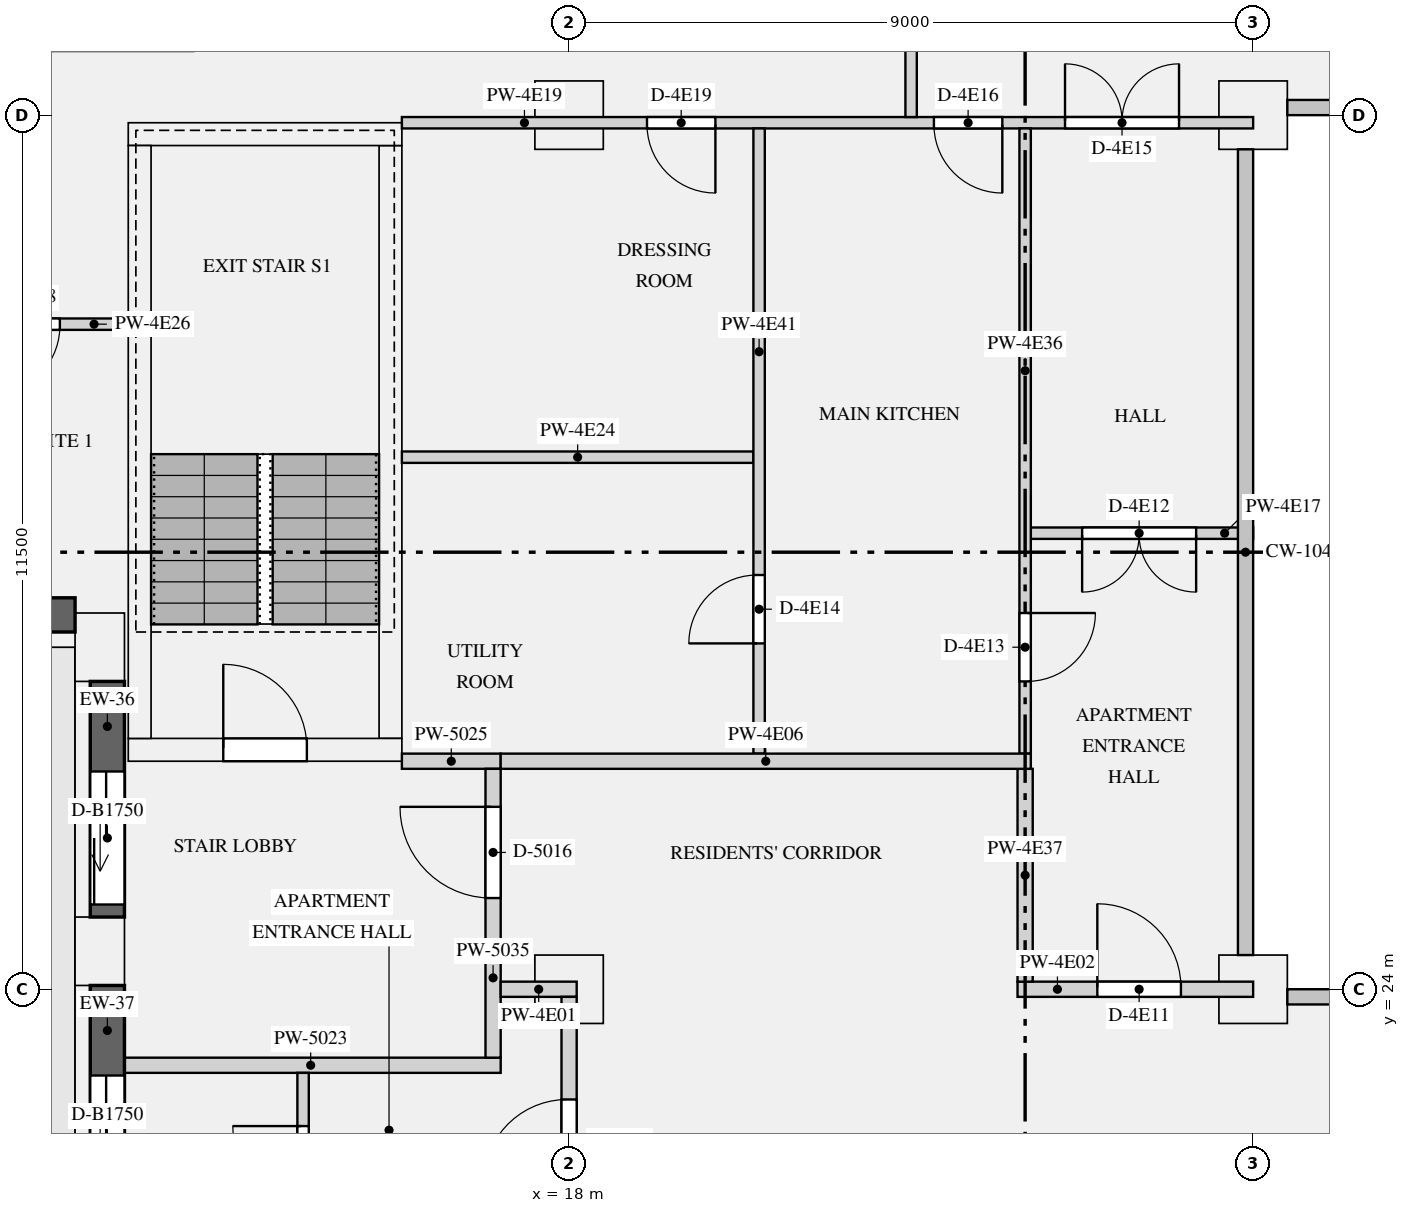
"""IFC4 building model, lengths in metres.
Left out: names, types, materials, properties, quantities, classifications, styles, units other than length and angle.
Written with IfcOpenShell. Run it as: python <this file> out.ifc"""

import sys

from ifc_helpers import new_model, si_unit, direction, frame, frame_2d, origin, origin_2d, place, context, subcontext, project, spatial, rectangle, extrude, element, fill, save


model = new_model("IFC4")
c1 = context("Model", 3, precision=1e-05, world=origin(), true_north=direction((0.0, 1.0)))
c2 = subcontext(c1, "Body", "Model", "MODEL_VIEW")
j1 = project(units=[si_unit("LENGTHUNIT", "METRE"), si_unit("PLANEANGLEUNIT", "RADIAN")], contexts=[c1])
p1 = place(None, origin())
s1 = spatial("IfcSite", under=j1, at=p1, CompositionType="ELEMENT")
p2 = place(p1, origin())
s2 = spatial("IfcBuilding", under=s1, at=p2, CompositionType="ELEMENT")
p3 = place(p2, frame((0.0, 0.0, 232.65)))
s3 = spatial("IfcBuildingStorey", under=s2, at=p3, CompositionType="ELEMENT", Elevation=232.65)
for number, where, z_axis, x_axis in (
    (1, (11.825, 28.5, 0.0), (0.0, 0.0, 1.0), (0.0, -1.0, 0.0)),
    (2, (11.825, 24.5, 0.0), (0.0, 0.0, 1.0), (0.0, -1.0, 0.0)),
):
    element("IfcColumn", number, at=place(p3, frame(where, z_axis=z_axis, x_axis=x_axis)), inside=s3, PredefinedType="USERDEFINED", context=c2, shape_type="SweptSolid", body=[
        extrude(rectangle(XDim=0.9, YDim=0.65, at=origin_2d()), origin(), (0.0, 0.0, 1.0), 3.15),
    ])
for number, where, z_axis, x_axis in (
    (3, (18.0, 24.0, 0.0), (0.0, 0.0, 1.0), (1.0, 0.0, 0.0)),
    (4, (27.0, 24.0, 0.0), (0.0, 0.0, 1.0), (1.0, 0.0, 0.0)),
    (5, (18.0, 35.5, 0.0), (0.0, 0.0, 1.0), (1.0, 0.0, 0.0)),
    (6, (27.0, 35.5, 0.0), (0.0, 0.0, 1.0), (1.0, 0.0, 0.0)),
):
    element("IfcColumn", number, at=place(p3, frame(where, z_axis=z_axis, x_axis=x_axis)), inside=s3, PredefinedType="COLUMN", context=c2, shape_type="SweptSolid", body=[
        extrude(rectangle(XDim=0.9, YDim=0.9, at=origin_2d()), origin(), (0.0, 0.0, 1.0), 3.15),
    ])
p4 = place(p3, frame((12.2, 27.15, 0.0), z_axis=(0.0, 0.0, 1.0), x_axis=(1.0, 0.0, 0.0)))
e7 = element("IfcWall", 7, at=p4, inside=s3, PredefinedType="SHEAR", context=c2, shape_type="SweptSolid", body=[
    extrude(rectangle(XDim=3.6, YDim=0.3, at=frame_2d((1.8, 0.0))), origin(), (0.0, 0.0, 1.0), 3.15),
])
p5 = place(p4, frame((1.25, 0.0, 0.0)))
e8 = element("IfcOpeningElement", 8, at=p5, cuts=e7, PredefinedType="OPENING", context=c2, shape_type="SweptSolid", body=[
    extrude(rectangle(XDim=1.1, YDim=2.1, at=frame_2d((0.55, 1.05))), frame((0.0, 0.16, 0.0), z_axis=(0.0, -1.0, 0.0), x_axis=(1.0, 0.0, 0.0)), (0.0, 0.0, 1.0), 0.32),
])
p6 = place(p3, frame((12.2, 35.25, 0.0), z_axis=(0.0, 0.0, 1.0), x_axis=(1.0, 0.0, 0.0)))
e9 = element("IfcWall", 9, at=p6, inside=s3, PredefinedType="SHEAR", context=c2, shape_type="SweptSolid", body=[
    extrude(rectangle(XDim=3.6, YDim=0.3, at=frame_2d((1.8, 0.0))), origin(), (0.0, 0.0, 1.0), 3.15),
])
for number, where, z_axis, x_axis in (
    (10, (12.35, 27.3, 0.0), (0.0, 0.0, 1.0), (0.0, 1.0, 0.0)),
    (11, (15.65, 27.3, 0.0), (0.0, 0.0, 1.0), (0.0, 1.0, 0.0)),
):
    element("IfcWall", number, at=place(p3, frame(where, z_axis=z_axis, x_axis=x_axis)), inside=s3, PredefinedType="SHEAR", context=c2, shape_type="SweptSolid", body=[
        extrude(rectangle(XDim=7.8, YDim=0.3, at=frame_2d((3.9, 0.0))), origin(), (0.0, 0.0, 1.0), 3.15),
    ])
p7 = place(p3, frame((9.9, 28.925, 0.9), z_axis=(0.0, 0.0, 1.0), x_axis=(1.0, 0.0, 0.0)))
e12 = element("IfcWall", 12, at=p7, inside=s3, PredefinedType="SOLIDWALL", context=c2, shape_type="SweptSolid", body=[
    extrude(rectangle(XDim=1.6, YDim=0.45, at=frame_2d((0.8, 0.0))), origin(), (0.0, 0.0, 1.0), 1.9),
])
p8 = place(p3, frame((11.925, 28.05, 0.0), z_axis=(0.0, 0.0, 1.0), x_axis=(0.0, -1.0, 0.0)))
e13 = element("IfcWall", 13, at=p8, inside=s3, PredefinedType="SOLIDWALL", context=c2, shape_type="SweptSolid", body=[
    extrude(rectangle(XDim=3.1, YDim=0.45, at=frame_2d((1.55, 0.0))), origin(), (0.0, 0.0, 1.0), 2.8),
])
p9 = place(p8, frame((1.185, 0.0, 0.0)))
e14 = element("IfcOpeningElement", 14, at=p9, cuts=e13, PredefinedType="OPENING", context=c2, shape_type="SweptSolid", body=[
    extrude(rectangle(XDim=1.75, YDim=2.3, at=frame_2d((0.875, 1.15))), frame((0.0, 0.235, 0.0), z_axis=(0.0, -1.0, 0.0), x_axis=(1.0, 0.0, 0.0)), (0.0, 0.0, 1.0), 0.47),
])
p10 = place(p3, frame((11.925, 24.05, 0.0), z_axis=(0.0, 0.0, 1.0), x_axis=(0.0, -1.0, 0.0)))
e15 = element("IfcWall", 15, at=p10, inside=s3, PredefinedType="SOLIDWALL", context=c2, shape_type="SweptSolid", body=[
    extrude(rectangle(XDim=3.1, YDim=0.45, at=frame_2d((1.55, 0.0))), origin(), (0.0, 0.0, 1.0), 2.8),
])
p11 = place(p10, frame((1.185, 0.0, 0.0)))
e16 = element("IfcOpeningElement", 16, at=p11, cuts=e15, PredefinedType="OPENING", context=c2, shape_type="SweptSolid", body=[
    extrude(rectangle(XDim=1.75, YDim=2.3, at=frame_2d((0.875, 1.15))), frame((0.0, 0.235, 0.0), z_axis=(0.0, -1.0, 0.0), x_axis=(1.0, 0.0, 0.0)), (0.0, 0.0, 1.0), 0.47),
])
p12 = place(p3, frame((12.1, 23.0, 0.0), z_axis=(0.0, 0.0, 1.0), x_axis=(1.0, 0.0, 0.0)))
e17 = element("IfcWall", 17, at=p12, inside=s3, PredefinedType="PARTITIONING", context=c2, shape_type="SweptSolid", body=[
    extrude(rectangle(XDim=5.0, YDim=0.2, at=frame_2d((2.5, 0.0))), origin(), (0.0, 0.0, 1.0), 2.8),
])
p13 = place(p3, frame((15.8, 27.0, 0.0), z_axis=(0.0, 0.0, 1.0), x_axis=(1.0, 0.0, 0.0)))
e18 = element("IfcWall", 18, at=p13, inside=s3, PredefinedType="PARTITIONING", context=c2, shape_type="SweptSolid", body=[
    extrude(rectangle(XDim=1.3, YDim=0.2, at=frame_2d((0.65, 0.0))), origin(), (0.0, 0.0, 1.0), 2.8),
])
p14 = place(p3, frame((17.0, 23.1, 0.0), z_axis=(0.0, 0.0, 1.0), x_axis=(0.0, 1.0, 0.0)))
e19 = element("IfcWall", 19, at=p14, inside=s3, PredefinedType="PARTITIONING", context=c2, shape_type="SweptSolid", body=[
    extrude(rectangle(XDim=3.8, YDim=0.2, at=frame_2d((1.9, 0.0))), origin(), (0.0, 0.0, 1.0), 2.8),
])
p15 = place(p14, frame((2.1, 0.0, 0.0)))
e20 = element("IfcOpeningElement", 20, at=p15, cuts=e19, PredefinedType="OPENING", context=c2, shape_type="SweptSolid", body=[
    extrude(rectangle(XDim=1.2, YDim=2.1, at=frame_2d((0.6, 1.05))), frame((0.0, 0.11, 0.0), z_axis=(0.0, -1.0, 0.0), x_axis=(1.0, 0.0, 0.0)), (0.0, 0.0, 1.0), 0.22),
])
p16 = place(p3, frame((17.1, 24.0, 0.0), z_axis=(0.0, 0.0, 1.0), x_axis=(1.0, 0.0, 0.0)))
e21 = element("IfcWall", 21, at=p16, inside=s3, PredefinedType="PARTITIONING", context=c2, shape_type="SweptSolid", body=[
    extrude(rectangle(XDim=1.0, YDim=0.2, at=frame_2d((0.5, 0.0))), origin(), (0.0, 0.0, 1.0), 2.8),
])
p17 = place(p3, frame((23.9, 24.0, 0.0), z_axis=(0.0, 0.0, 1.0), x_axis=(1.0, 0.0, 0.0)))
e22 = element("IfcWall", 22, at=p17, inside=s3, PredefinedType="PARTITIONING", context=c2, shape_type="SweptSolid", body=[
    extrude(rectangle(XDim=3.1, YDim=0.2, at=frame_2d((1.55, 0.0))), origin(), (0.0, 0.0, 1.0), 2.8),
])
p18 = place(p17, frame((1.05, 0.0, 0.0)))
e23 = element("IfcOpeningElement", 23, at=p18, cuts=e22, PredefinedType="OPENING", context=c2, shape_type="SweptSolid", body=[
    extrude(rectangle(XDim=1.1, YDim=2.1, at=frame_2d((0.55, 1.05))), frame((0.0, 0.11, 0.0), z_axis=(0.0, -1.0, 0.0), x_axis=(1.0, 0.0, 0.0)), (0.0, 0.0, 1.0), 0.22),
])
p19 = place(p3, frame((17.1, 27.0, 0.0), z_axis=(0.0, 0.0, 1.0), x_axis=(1.0, 0.0, 0.0)))
e24 = element("IfcWall", 24, at=p19, inside=s3, PredefinedType="PARTITIONING", context=c2, shape_type="SweptSolid", body=[
    extrude(rectangle(XDim=6.975, YDim=0.2, at=frame_2d((3.487, 0.0))), origin(), (0.0, 0.0, 1.0), 2.8),
])
p20 = place(p3, frame((24.075, 30.0, 0.0), z_axis=(0.0, 0.0, 1.0), x_axis=(1.0, 0.0, 0.0)))
e25 = element("IfcWall", 25, at=p20, inside=s3, PredefinedType="PARTITIONING", context=c2, shape_type="SweptSolid", body=[
    extrude(rectangle(XDim=2.925, YDim=0.15, at=frame_2d((1.462, 0.0))), origin(), (0.0, 0.0, 1.0), 2.8),
])
p21 = place(p20, frame((0.675, 0.0, 0.0)))
e26 = element("IfcOpeningElement", 26, at=p21, cuts=e25, PredefinedType="OPENING", context=c2, shape_type="SweptSolid", body=[
    extrude(rectangle(XDim=1.5, YDim=2.1, at=frame_2d((0.75, 1.05))), frame((0.0, 0.085, 0.0), z_axis=(0.0, -1.0, 0.0), x_axis=(1.0, 0.0, 0.0)), (0.0, 0.0, 1.0), 0.17),
])
p22 = place(p3, frame((15.8, 35.4, 0.0), z_axis=(0.0, 0.0, 1.0), x_axis=(1.0, 0.0, 0.0)))
e27 = element("IfcWall", 27, at=p22, inside=s3, PredefinedType="PARTITIONING", context=c2, shape_type="SweptSolid", body=[
    extrude(rectangle(XDim=11.2, YDim=0.15, at=frame_2d((5.6, 0.0))), origin(), (0.0, 0.0, 1.0), 2.8),
])
p23 = place(p22, frame((8.725, 0.0, 0.0)))
e28 = element("IfcOpeningElement", 28, at=p23, cuts=e27, PredefinedType="OPENING", context=c2, shape_type="SweptSolid", body=[
    extrude(rectangle(XDim=1.5, YDim=2.1, at=frame_2d((0.75, 1.05))), frame((0.0, 0.085, 0.0), z_axis=(0.0, -1.0, 0.0), x_axis=(1.0, 0.0, 0.0)), (0.0, 0.0, 1.0), 0.17),
])
p24 = place(p22, frame((7.0, 0.0, 0.0)))
e29 = element("IfcOpeningElement", 29, at=p24, cuts=e27, PredefinedType="OPENING", context=c2, shape_type="SweptSolid", body=[
    extrude(rectangle(XDim=0.9, YDim=2.1, at=frame_2d((0.45, 1.05))), frame((0.0, 0.085, 0.0), z_axis=(0.0, -1.0, 0.0), x_axis=(1.0, 0.0, 0.0)), (0.0, 0.0, 1.0), 0.17),
])
p25 = place(p22, frame((3.225, 0.0, 0.0)))
e30 = element("IfcOpeningElement", 30, at=p25, cuts=e27, PredefinedType="OPENING", context=c2, shape_type="SweptSolid", body=[
    extrude(rectangle(XDim=0.9, YDim=2.1, at=frame_2d((0.45, 1.05))), frame((0.0, 0.085, 0.0), z_axis=(0.0, -1.0, 0.0), x_axis=(1.0, 0.0, 0.0)), (0.0, 0.0, 1.0), 0.17),
])
p26 = place(p3, frame((15.8, 31.0, 0.0), z_axis=(0.0, 0.0, 1.0), x_axis=(1.0, 0.0, 0.0)))
e31 = element("IfcWall", 31, at=p26, inside=s3, PredefinedType="PARTITIONING", context=c2, shape_type="SweptSolid", body=[
    extrude(rectangle(XDim=4.625, YDim=0.15, at=frame_2d((2.312, 0.0))), origin(), (0.0, 0.0, 1.0), 2.8),
])
p27 = place(p3, frame((9.65, 32.75, 0.0), z_axis=(0.0, 0.0, 1.0), x_axis=(1.0, 0.0, 0.0)))
e32 = element("IfcWall", 32, at=p27, inside=s3, PredefinedType="PARTITIONING", context=c2, shape_type="SweptSolid", body=[
    extrude(rectangle(XDim=2.55, YDim=0.15, at=frame_2d((1.275, 0.0))), origin(), (0.0, 0.0, 1.0), 2.8),
])
p28 = place(p27, frame((0.75, 0.0, 0.0)))
e33 = element("IfcOpeningElement", 33, at=p28, cuts=e32, PredefinedType="OPENING", context=c2, shape_type="SweptSolid", body=[
    extrude(rectangle(XDim=0.9, YDim=2.1, at=frame_2d((0.45, 1.05))), frame((0.0, 0.085, 0.0), z_axis=(0.0, -1.0, 0.0), x_axis=(1.0, 0.0, 0.0)), (0.0, 0.0, 1.0), 0.17),
])
p29 = place(p3, frame((18.0, 16.1, 0.0), z_axis=(0.0, 0.0, 1.0), x_axis=(0.0, 1.0, 0.0)))
e34 = element("IfcWall", 34, at=p29, inside=s3, PredefinedType="PARTITIONING", context=c2, shape_type="SweptSolid", body=[
    extrude(rectangle(XDim=7.8, YDim=0.2, at=frame_2d((3.9, 0.0))), origin(), (0.0, 0.0, 1.0), 2.8),
])
p30 = place(p29, frame((5.35, 0.0, 0.0)))
e35 = element("IfcOpeningElement", 35, at=p30, cuts=e34, PredefinedType="OPENING", context=c2, shape_type="SweptSolid", body=[
    extrude(rectangle(XDim=1.1, YDim=2.1, at=frame_2d((0.55, 1.05))), frame((0.0, 0.11, 0.0), z_axis=(0.0, -1.0, 0.0), x_axis=(1.0, 0.0, 0.0)), (0.0, 0.0, 1.0), 0.22),
])
p31 = place(p3, frame((24.0, 27.1, 0.0), z_axis=(0.0, 0.0, 1.0), x_axis=(0.0, 1.0, 0.0)))
e36 = element("IfcWall", 36, at=p31, inside=s3, PredefinedType="PARTITIONING", context=c2, shape_type="SweptSolid", body=[
    extrude(rectangle(XDim=8.225, YDim=0.15, at=frame_2d((4.112, 0.0))), origin(), (0.0, 0.0, 1.0), 2.8),
])
p32 = place(p31, frame((0.95, 0.0, 0.0)))
e37 = element("IfcOpeningElement", 37, at=p32, cuts=e36, PredefinedType="OPENING", context=c2, shape_type="SweptSolid", body=[
    extrude(rectangle(XDim=0.9, YDim=2.1, at=frame_2d((0.45, 1.05))), frame((0.0, 0.085, 0.0), z_axis=(0.0, -1.0, 0.0), x_axis=(1.0, 0.0, 0.0)), (0.0, 0.0, 1.0), 0.17),
])
p33 = place(p3, frame((24.0, 24.1, 0.0), z_axis=(0.0, 0.0, 1.0), x_axis=(0.0, 1.0, 0.0)))
e38 = element("IfcWall", 38, at=p33, inside=s3, PredefinedType="PARTITIONING", context=c2, shape_type="SweptSolid", body=[
    extrude(rectangle(XDim=2.8, YDim=0.2, at=frame_2d((1.4, 0.0))), origin(), (0.0, 0.0, 1.0), 2.8),
])
p34 = place(p3, frame((14.5, 20.575, 0.0), z_axis=(0.0, 0.0, 1.0), x_axis=(0.0, 1.0, 0.0)))
e39 = element("IfcWall", 39, at=p34, inside=s3, PredefinedType="PARTITIONING", context=c2, shape_type="SweptSolid", body=[
    extrude(rectangle(XDim=2.325, YDim=0.15, at=frame_2d((1.163, 0.0))), origin(), (0.0, 0.0, 1.0), 2.8),
])
p35 = place(p34, frame((0.725, 0.0, 0.0)))
e40 = element("IfcOpeningElement", 40, at=p35, cuts=e39, PredefinedType="OPENING", context=c2, shape_type="SweptSolid", body=[
    extrude(rectangle(XDim=0.9, YDim=2.1, at=frame_2d((0.45, 1.05))), frame((0.0, 0.085, 0.0), z_axis=(0.0, -1.0, 0.0), x_axis=(1.0, 0.0, 0.0)), (0.0, 0.0, 1.0), 0.17),
])
p36 = place(p3, frame((20.5, 27.1, 0.0), z_axis=(0.0, 0.0, 1.0), x_axis=(0.0, 1.0, 0.0)))
e41 = element("IfcWall", 41, at=p36, inside=s3, PredefinedType="PARTITIONING", context=c2, shape_type="SweptSolid", body=[
    extrude(rectangle(XDim=8.225, YDim=0.15, at=frame_2d((4.112, 0.0))), origin(), (0.0, 0.0, 1.0), 2.8),
])
p37 = place(p36, frame((1.45, 0.0, 0.0)))
e42 = element("IfcOpeningElement", 42, at=p37, cuts=e41, PredefinedType="OPENING", context=c2, shape_type="SweptSolid", body=[
    extrude(rectangle(XDim=0.9, YDim=2.1, at=frame_2d((0.45, 1.05))), frame((0.0, 0.085, 0.0), z_axis=(0.0, -1.0, 0.0), x_axis=(1.0, 0.0, 0.0)), (0.0, 0.0, 1.0), 0.17),
])
p38 = place(p3, frame((22.5, 35.475, 0.0), z_axis=(0.0, 0.0, 1.0), x_axis=(0.0, 1.0, 0.0)))
e43 = element("IfcWall", 43, at=p38, inside=s3, PredefinedType="PARTITIONING", context=c2, shape_type="SweptSolid", body=[
    extrude(rectangle(XDim=5.375, YDim=0.15, at=frame_2d((2.688, 0.0))), origin(), (0.0, 0.0, 1.0), 2.8),
])
p39 = place(p38, frame((2.275, 0.0, 0.0)))
e44 = element("IfcOpeningElement", 44, at=p39, cuts=e43, PredefinedType="OPENING", context=c2, shape_type="SweptSolid", body=[
    extrude(rectangle(XDim=0.9, YDim=2.1, at=frame_2d((0.45, 1.05))), frame((0.0, 0.085, 0.0), z_axis=(0.0, -1.0, 0.0), x_axis=(1.0, 0.0, 0.0)), (0.0, 0.0, 1.0), 0.17),
])
p40 = place(p9, frame((1.75, -0.19, 0.0), z_axis=(0.0, 0.0, 1.0), x_axis=(-1.0, 0.0, 0.0)))
e45 = element("IfcDoor", 45, at=p40, inside=s3, OperationType="SLIDING_TO_LEFT", PredefinedType="DOOR", context=c2, shape_type="SweptSolid", body=[
    extrude(rectangle(XDim=1.75, YDim=2.3, at=frame_2d((0.875, 1.15))), frame((0.0, -0.07, 0.0), z_axis=(0.0, -1.0, 0.0), x_axis=(1.0, 0.0, 0.0)), (0.0, 0.0, 1.0), 0.05),
])
fill(e14, e45)
p41 = place(p11, origin())
e46 = element("IfcDoor", 46, at=p41, inside=s3, OperationType="SLIDING_TO_LEFT", PredefinedType="DOOR", context=c2, shape_type="SweptSolid", body=[
    extrude(rectangle(XDim=1.75, YDim=2.3, at=frame_2d((0.875, 1.15))), frame((0.0, -0.07, 0.0), z_axis=(0.0, -1.0, 0.0), x_axis=(1.0, 0.0, 0.0)), (0.0, 0.0, 1.0), 0.05),
])
fill(e16, e46)
p42 = place(p5, origin())
e47 = element("IfcDoor", 47, at=p42, inside=s3, OperationType="SINGLE_SWING_LEFT", PredefinedType="DOOR", context=c2, shape_type="SweptSolid", body=[
    extrude(rectangle(XDim=1.1, YDim=2.1, at=frame_2d((0.55, 1.05))), frame((0.0, 0.025, 0.0), z_axis=(0.0, -1.0, 0.0), x_axis=(1.0, 0.0, 0.0)), (0.0, 0.0, 1.0), 0.05),
])
fill(e8, e47)
p43 = place(p15, origin())
e48 = element("IfcDoor", 48, at=p43, inside=s3, OperationType="SINGLE_SWING_RIGHT", PredefinedType="DOOR", context=c2, shape_type="SweptSolid", body=[
    extrude(rectangle(XDim=1.2, YDim=2.1, at=frame_2d((0.6, 1.05))), frame((0.0, 0.025, 0.0), z_axis=(0.0, -1.0, 0.0), x_axis=(1.0, 0.0, 0.0)), (0.0, 0.0, 1.0), 0.05),
])
fill(e20, e48)
p44 = place(p30, origin())
e49 = element("IfcDoor", 49, at=p44, inside=s3, OperationType="SINGLE_SWING_LEFT", PredefinedType="DOOR", context=c2, shape_type="SweptSolid", body=[
    extrude(rectangle(XDim=1.1, YDim=2.1, at=frame_2d((0.55, 1.05))), frame((0.0, 0.025, 0.0), z_axis=(0.0, -1.0, 0.0), x_axis=(1.0, 0.0, 0.0)), (0.0, 0.0, 1.0), 0.05),
])
fill(e35, e49)
p45 = place(p35, origin())
e50 = element("IfcDoor", 50, at=p45, inside=s3, OperationType="SINGLE_SWING_RIGHT", PredefinedType="DOOR", context=c2, shape_type="SweptSolid", body=[
    extrude(rectangle(XDim=0.9, YDim=2.1, at=frame_2d((0.45, 1.05))), frame((0.0, 0.025, 0.0), z_axis=(0.0, -1.0, 0.0), x_axis=(1.0, 0.0, 0.0)), (0.0, 0.0, 1.0), 0.05),
])
fill(e40, e50)
p46 = place(p18, origin())
e51 = element("IfcDoor", 51, at=p46, inside=s3, OperationType="SINGLE_SWING_LEFT", PredefinedType="DOOR", context=c2, shape_type="SweptSolid", body=[
    extrude(rectangle(XDim=1.1, YDim=2.1, at=frame_2d((0.55, 1.05))), frame((0.0, 0.025, 0.0), z_axis=(0.0, -1.0, 0.0), x_axis=(1.0, 0.0, 0.0)), (0.0, 0.0, 1.0), 0.05),
])
fill(e23, e51)
p47 = place(p21, frame((1.5, 0.0, 0.0), z_axis=(0.0, 0.0, 1.0), x_axis=(-1.0, 0.0, 0.0)))
e52 = element("IfcDoor", 52, at=p47, inside=s3, OperationType="DOUBLE_DOOR_SINGLE_SWING", PredefinedType="DOOR", context=c2, shape_type="SweptSolid", body=[
    extrude(rectangle(XDim=1.5, YDim=2.1, at=frame_2d((0.75, 1.05))), frame((0.0, 0.025, 0.0), z_axis=(0.0, -1.0, 0.0), x_axis=(1.0, 0.0, 0.0)), (0.0, 0.0, 1.0), 0.05),
])
fill(e26, e52)
p48 = place(p32, frame((0.9, 0.0, 0.0), z_axis=(0.0, 0.0, 1.0), x_axis=(-1.0, 0.0, 0.0)))
e53 = element("IfcDoor", 53, at=p48, inside=s3, OperationType="SINGLE_SWING_LEFT", PredefinedType="DOOR", context=c2, shape_type="SweptSolid", body=[
    extrude(rectangle(XDim=0.9, YDim=2.1, at=frame_2d((0.45, 1.05))), frame((0.0, 0.025, 0.0), z_axis=(0.0, -1.0, 0.0), x_axis=(1.0, 0.0, 0.0)), (0.0, 0.0, 1.0), 0.05),
])
fill(e37, e53)
p49 = place(p37, origin())
e54 = element("IfcDoor", 54, at=p49, inside=s3, OperationType="SINGLE_SWING_LEFT", PredefinedType="DOOR", context=c2, shape_type="SweptSolid", body=[
    extrude(rectangle(XDim=0.9, YDim=2.1, at=frame_2d((0.45, 1.05))), frame((0.0, 0.025, 0.0), z_axis=(0.0, -1.0, 0.0), x_axis=(1.0, 0.0, 0.0)), (0.0, 0.0, 1.0), 0.05),
])
fill(e42, e54)
p50 = place(p23, origin())
e55 = element("IfcDoor", 55, at=p50, inside=s3, OperationType="DOUBLE_DOOR_SINGLE_SWING", PredefinedType="DOOR", context=c2, shape_type="SweptSolid", body=[
    extrude(rectangle(XDim=1.5, YDim=2.1, at=frame_2d((0.75, 1.05))), frame((0.0, 0.025, 0.0), z_axis=(0.0, -1.0, 0.0), x_axis=(1.0, 0.0, 0.0)), (0.0, 0.0, 1.0), 0.05),
])
fill(e28, e55)
p51 = place(p24, frame((0.9, 0.0, 0.0), z_axis=(0.0, 0.0, 1.0), x_axis=(-1.0, 0.0, 0.0)))
e56 = element("IfcDoor", 56, at=p51, inside=s3, OperationType="SINGLE_SWING_LEFT", PredefinedType="DOOR", context=c2, shape_type="SweptSolid", body=[
    extrude(rectangle(XDim=0.9, YDim=2.1, at=frame_2d((0.45, 1.05))), frame((0.0, 0.025, 0.0), z_axis=(0.0, -1.0, 0.0), x_axis=(1.0, 0.0, 0.0)), (0.0, 0.0, 1.0), 0.05),
])
fill(e29, e56)
p52 = place(p28, frame((0.9, 0.0, 0.0), z_axis=(0.0, 0.0, 1.0), x_axis=(-1.0, 0.0, 0.0)))
e57 = element("IfcDoor", 57, at=p52, inside=s3, OperationType="SINGLE_SWING_RIGHT", PredefinedType="DOOR", context=c2, shape_type="SweptSolid", body=[
    extrude(rectangle(XDim=0.9, YDim=2.1, at=frame_2d((0.45, 1.05))), frame((0.0, 0.025, 0.0), z_axis=(0.0, -1.0, 0.0), x_axis=(1.0, 0.0, 0.0)), (0.0, 0.0, 1.0), 0.05),
])
fill(e33, e57)
p53 = place(p25, frame((0.9, 0.0, 0.0), z_axis=(0.0, 0.0, 1.0), x_axis=(-1.0, 0.0, 0.0)))
e58 = element("IfcDoor", 58, at=p53, inside=s3, OperationType="SINGLE_SWING_LEFT", PredefinedType="DOOR", context=c2, shape_type="SweptSolid", body=[
    extrude(rectangle(XDim=0.9, YDim=2.1, at=frame_2d((0.45, 1.05))), frame((0.0, 0.025, 0.0), z_axis=(0.0, -1.0, 0.0), x_axis=(1.0, 0.0, 0.0)), (0.0, 0.0, 1.0), 0.05),
])
fill(e30, e58)
save(model, sys.argv[1])
